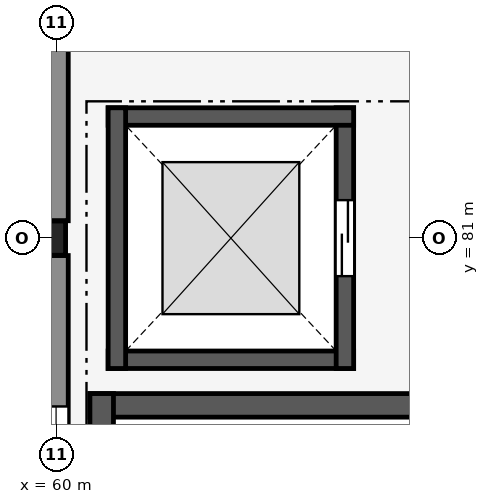
"""IFC4 building model, lengths in metres.
Left out: names, types, materials, properties, quantities, classifications, styles, units other than length and angle.
Written with IfcOpenShell. Run it as: python <this file> out.ifc"""

import sys

from ifc_helpers import new_model, si_unit, direction, frame, frame_2d, origin, origin_2d, place, context, subcontext, project, spatial, rectangle, i_section, extrude, element, fill, save


model = new_model("IFC4")
c1 = context("Model", 3, precision=1e-05, world=origin(), true_north=direction((0.0, 1.0)))
c2 = subcontext(c1, "Body", "Model", "MODEL_VIEW")
j1 = project(units=[si_unit("LENGTHUNIT", "METRE"), si_unit("PLANEANGLEUNIT", "RADIAN")], contexts=[c1])
p1 = place(None, origin())
s1 = spatial("IfcSite", under=j1, at=p1, CompositionType="ELEMENT")
p2 = place(p1, origin())
s2 = spatial("IfcBuilding", under=s1, at=p2, CompositionType="ELEMENT")
p3 = place(p2, frame((0.0, 0.0, 13.5)))
s3 = spatial("IfcBuildingStorey", under=s2, at=p3, CompositionType="ELEMENT", Elevation=13.5)
p4 = place(p3, frame((60.0, 81.0, 0.0), z_axis=(0.0, 0.0, 1.0), x_axis=(1.0, 0.0, 0.0)))
e1 = element("IfcColumn", 1, at=p4, inside=s3, PredefinedType="COLUMN", context=c2, shape_type="SweptSolid", body=[
    extrude(i_section(OverallWidth=0.25, OverallDepth=0.45, WebThickness=0.011, FlangeThickness=0.014, FilletRadius=0.015, at=origin_2d()), origin(), (0.0, 0.0, 1.0), 4.5),
])
p5 = place(p3, frame((60.0, 75.0, 0.0), z_axis=(0.0, 0.0, 1.0), x_axis=(0.0, 1.0, 0.0)))
e2 = element("IfcWall", 2, at=p5, inside=s3, PredefinedType="SOLIDWALL", context=c2, shape_type="SweptSolid", body=[
    extrude(rectangle(XDim=5.771, YDim=0.32, at=frame_2d((2.885, 0.0))), origin(), (0.0, 0.0, 1.0), 3.39),
])
p6 = place(p5, frame((1.986, 0.0, 1.1)))
e3 = element("IfcOpeningElement", 3, at=p6, cuts=e2, PredefinedType="OPENING", context=c2, shape_type="SweptSolid", body=[
    extrude(rectangle(XDim=1.8, YDim=1.2, at=frame_2d((0.9, 0.6))), frame((0.0, 0.17, 0.0), z_axis=(0.0, -1.0, 0.0), x_axis=(1.0, 0.0, 0.0)), (0.0, 0.0, 1.0), 0.34),
])
p7 = place(p3, frame((60.0, 81.229, 0.0), z_axis=(0.0, 0.0, 1.0), x_axis=(0.0, 1.0, 0.0)))
e4 = element("IfcWall", 4, at=p7, inside=s3, PredefinedType="SOLIDWALL", context=c2, shape_type="SweptSolid", body=[
    extrude(rectangle(XDim=5.467, YDim=0.32, at=frame_2d((2.733, 0.0))), origin(), (0.0, 0.0, 1.0), 3.39),
])
p8 = place(p3, frame((65.255, 78.8, 0.0), z_axis=(0.0, 0.0, 1.0), x_axis=(-1.0, 0.0, 0.0)))
e5 = element("IfcWall", 5, at=p8, inside=s3, PredefinedType="SHEAR", context=c2, shape_type="SweptSolid", body=[
    extrude(rectangle(XDim=4.81, YDim=0.31, at=frame_2d((2.405, 0.0))), origin(), (0.0, 0.0, 1.0), 4.36),
])
p9 = place(p3, frame((60.6, 78.955, 0.0), z_axis=(0.0, 0.0, 1.0), x_axis=(0.0, -1.0, 0.0)))
e6 = element("IfcWall", 6, at=p9, inside=s3, PredefinedType="SHEAR", context=c2, shape_type="SweptSolid", body=[
    extrude(rectangle(XDim=9.61, YDim=0.31, at=frame_2d((4.805, 0.0))), origin(), (0.0, 0.0, 1.0), 4.36),
])
p10 = place(p3, frame((60.685, 79.4, 0.0), z_axis=(0.0, 0.0, 1.0), x_axis=(1.0, 0.0, 0.0)))
e7 = element("IfcWall", 7, at=p10, inside=s3, PredefinedType="SHEAR", context=c2, shape_type="SweptSolid", body=[
    extrude(rectangle(XDim=3.23, YDim=0.23, at=frame_2d((1.615, 0.0))), origin(), (0.0, 0.0, 1.0), 4.5),
])
p11 = place(p3, frame((63.8, 79.285, 0.0), z_axis=(0.0, 0.0, 1.0), x_axis=(0.0, 1.0, 0.0)))
e8 = element("IfcWall", 8, at=p11, inside=s3, PredefinedType="SHEAR", context=c2, shape_type="SweptSolid", body=[
    extrude(rectangle(XDim=3.43, YDim=0.23, at=frame_2d((1.715, 0.0))), origin(), (0.0, 0.0, 1.0), 4.5),
])
p12 = place(p11, frame((1.215, 0.0, 0.0)))
e9 = element("IfcOpeningElement", 9, at=p12, cuts=e8, PredefinedType="OPENING", context=c2, shape_type="SweptSolid", body=[
    extrude(rectangle(XDim=1.0, YDim=2.15, at=frame_2d((0.5, 1.075))), frame((0.0, 0.125, 0.0), z_axis=(0.0, -1.0, 0.0), x_axis=(1.0, 0.0, 0.0)), (0.0, 0.0, 1.0), 0.25),
])
p13 = place(p3, frame((63.915, 82.6, 0.0), z_axis=(0.0, 0.0, 1.0), x_axis=(-1.0, 0.0, 0.0)))
e10 = element("IfcWall", 10, at=p13, inside=s3, PredefinedType="SHEAR", context=c2, shape_type="SweptSolid", body=[
    extrude(rectangle(XDim=3.23, YDim=0.23, at=frame_2d((1.615, 0.0))), origin(), (0.0, 0.0, 1.0), 4.5),
])
p14 = place(p3, frame((60.8, 82.715, 0.0), z_axis=(0.0, 0.0, 1.0), x_axis=(0.0, -1.0, 0.0)))
e11 = element("IfcWall", 11, at=p14, inside=s3, PredefinedType="SHEAR", context=c2, shape_type="SweptSolid", body=[
    extrude(rectangle(XDim=3.43, YDim=0.23, at=frame_2d((1.715, 0.0))), origin(), (0.0, 0.0, 1.0), 4.5),
])
p15 = place(p6, origin())
e12 = element("IfcWindow", 12, at=p15, inside=s3, PartitioningType="SINGLE_PANEL", PredefinedType="WINDOW", context=c2, shape_type="SweptSolid", body=[
    extrude(rectangle(XDim=1.8, YDim=1.2, at=frame_2d((0.9, 0.6))), frame((0.0, 0.03, 0.0), z_axis=(0.0, -1.0, 0.0), x_axis=(1.0, 0.0, 0.0)), (0.0, 0.0, 1.0), 0.06),
])
fill(e3, e12)
p16 = place(p12, origin())
e13 = element("IfcDoor", 13, at=p16, inside=s3, OperationType="SLIDING_TO_LEFT", PredefinedType="DOOR", context=c2, shape_type="SweptSolid", body=[
    extrude(rectangle(XDim=1.0, YDim=2.15, at=frame_2d((0.5, 1.075))), frame((0.0, 0.025, 0.0), z_axis=(0.0, -1.0, 0.0), x_axis=(1.0, 0.0, 0.0)), (0.0, 0.0, 1.0), 0.05),
])
fill(e9, e13)
save(model, sys.argv[1])
